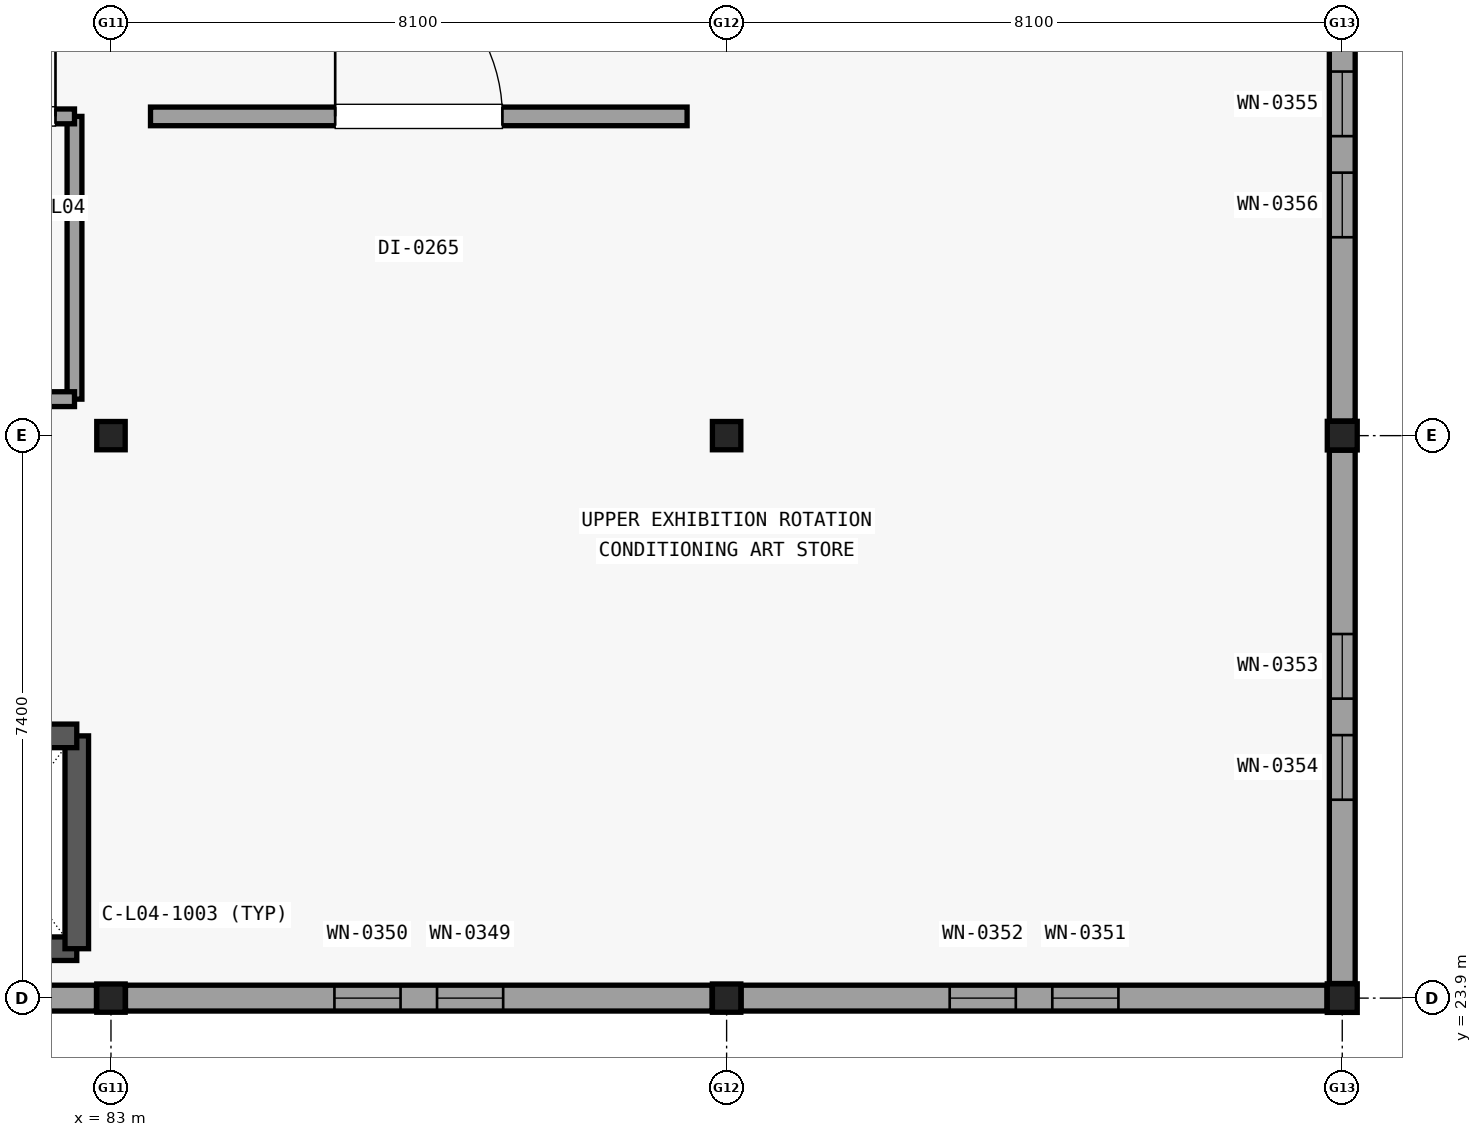
"""IFC4 building model, lengths in metres.
Left out: names, types, materials, properties, quantities, classifications, styles, units other than length and angle.
Written with IfcOpenShell. Run it as: python <this file> out.ifc"""

import sys

from ifc_helpers import new_model, si_unit, direction, frame, frame_2d, origin, origin_2d, place, context, subcontext, project, spatial, rectangle, i_section, extrude, element, fill, save


model = new_model("IFC4")
c1 = context("Model", 3, precision=1e-05, world=origin(), true_north=direction((0.0, 1.0)))
c2 = subcontext(c1, "Body", "Model", "MODEL_VIEW")
j1 = project(units=[si_unit("LENGTHUNIT", "METRE"), si_unit("PLANEANGLEUNIT", "RADIAN")], contexts=[c1])
p1 = place(None, origin())
s1 = spatial("IfcSite", under=j1, at=p1, CompositionType="ELEMENT")
p2 = place(p1, origin())
s2 = spatial("IfcBuilding", under=s1, at=p2, CompositionType="ELEMENT")
p3 = place(p2, frame((0.0, 0.0, 17.4)))
s3 = spatial("IfcBuildingStorey", under=s2, at=p3, CompositionType="ELEMENT", Elevation=17.4)
for number, where, z_axis, x_axis in (
    (1, (83.0, 23.9, 0.0), (0.0, 0.0, 1.0), (1.0, 0.0, 0.0)),
    (2, (83.0, 31.3, 0.0), (0.0, 0.0, 1.0), (1.0, 0.0, 0.0)),
    (3, (91.1, 23.9, 0.0), (0.0, 0.0, 1.0), (1.0, 0.0, 0.0)),
    (4, (91.1, 31.3, 0.0), (0.0, 0.0, 1.0), (1.0, 0.0, 0.0)),
):
    element("IfcColumn", number, at=place(p3, frame(where, z_axis=z_axis, x_axis=x_axis)), inside=s3, PredefinedType="COLUMN", context=c2, shape_type="SweptSolid", body=[
        extrude(i_section(OverallWidth=0.374, OverallDepth=0.372, WebThickness=0.016, FlangeThickness=0.026, at=origin_2d()), origin(), (0.0, 0.0, 1.0), 3.38),
    ])
for number, where, z_axis, x_axis in (
    (5, (99.2, 23.9, 0.0), (0.0, 0.0, 1.0), (1.0, 0.0, 0.0)),
    (6, (99.2, 31.3, 0.0), (0.0, 0.0, 1.0), (1.0, 0.0, 0.0)),
):
    element("IfcColumn", number, at=place(p3, frame(where, z_axis=z_axis, x_axis=x_axis)), inside=s3, PredefinedType="COLUMN", context=c2, shape_type="SweptSolid", body=[
        extrude(i_section(OverallWidth=0.394, OverallDepth=0.376, WebThickness=0.017, FlangeThickness=0.028, at=origin_2d()), origin(), (0.0, 0.0, 1.0), 3.38),
    ])
p4 = place(p3, frame((82.809, 23.9, 0.0), z_axis=(0.0, 0.0, 1.0), x_axis=(-1.0, 0.0, 0.0)))
e7 = element("IfcWall", 7, at=p4, inside=s3, PredefinedType="SOLIDWALL", context=c2, shape_type="SweptSolid", body=[
    extrude(rectangle(XDim=7.708, YDim=0.34, at=frame_2d((3.854, 0.0))), origin(), (0.0, 0.0, 1.0), 2.908),
])
p5 = place(p4, frame((2.744, 0.0, 0.6)))
e8 = element("IfcOpeningElement", 8, at=p5, cuts=e7, PredefinedType="OPENING", context=c2, shape_type="SweptSolid", body=[
    extrude(rectangle(XDim=0.87, YDim=1.82, at=frame_2d((0.435, 0.91))), frame((0.0, 0.18, 0.0), z_axis=(0.0, -1.0, 0.0), x_axis=(1.0, 0.0, 0.0)), (0.0, 0.0, 1.0), 0.36),
])
p6 = place(p4, frame((4.094, 0.0, 0.6)))
e9 = element("IfcOpeningElement", 9, at=p6, cuts=e7, PredefinedType="OPENING", context=c2, shape_type="SweptSolid", body=[
    extrude(rectangle(XDim=0.87, YDim=1.82, at=frame_2d((0.435, 0.91))), frame((0.0, 0.18, 0.0), z_axis=(0.0, -1.0, 0.0), x_axis=(1.0, 0.0, 0.0)), (0.0, 0.0, 1.0), 0.36),
])
p7 = place(p3, frame((90.909, 23.9, 0.0), z_axis=(0.0, 0.0, 1.0), x_axis=(-1.0, 0.0, 0.0)))
e10 = element("IfcWall", 10, at=p7, inside=s3, PredefinedType="SOLIDWALL", context=c2, shape_type="SweptSolid", body=[
    extrude(rectangle(XDim=7.718, YDim=0.34, at=frame_2d((3.859, 0.0))), origin(), (0.0, 0.0, 1.0), 2.908),
])
p8 = place(p7, frame((2.749, 0.0, 0.6)))
e11 = element("IfcOpeningElement", 11, at=p8, cuts=e10, PredefinedType="OPENING", context=c2, shape_type="SweptSolid", body=[
    extrude(rectangle(XDim=0.87, YDim=1.82, at=frame_2d((0.435, 0.91))), frame((0.0, 0.18, 0.0), z_axis=(0.0, -1.0, 0.0), x_axis=(1.0, 0.0, 0.0)), (0.0, 0.0, 1.0), 0.36),
])
p9 = place(p7, frame((4.099, 0.0, 0.6)))
e12 = element("IfcOpeningElement", 12, at=p9, cuts=e10, PredefinedType="OPENING", context=c2, shape_type="SweptSolid", body=[
    extrude(rectangle(XDim=0.87, YDim=1.82, at=frame_2d((0.435, 0.91))), frame((0.0, 0.18, 0.0), z_axis=(0.0, -1.0, 0.0), x_axis=(1.0, 0.0, 0.0)), (0.0, 0.0, 1.0), 0.36),
])
p10 = place(p3, frame((98.999, 23.9, 0.0), z_axis=(0.0, 0.0, 1.0), x_axis=(-1.0, 0.0, 0.0)))
e13 = element("IfcWall", 13, at=p10, inside=s3, PredefinedType="SOLIDWALL", context=c2, shape_type="SweptSolid", body=[
    extrude(rectangle(XDim=7.708, YDim=0.34, at=frame_2d((3.854, 0.0))), origin(), (0.0, 0.0, 1.0), 2.908),
])
p11 = place(p10, frame((2.744, 0.0, 0.6)))
e14 = element("IfcOpeningElement", 14, at=p11, cuts=e13, PredefinedType="OPENING", context=c2, shape_type="SweptSolid", body=[
    extrude(rectangle(XDim=0.87, YDim=1.82, at=frame_2d((0.435, 0.91))), frame((0.0, 0.18, 0.0), z_axis=(0.0, -1.0, 0.0), x_axis=(1.0, 0.0, 0.0)), (0.0, 0.0, 1.0), 0.36),
])
p12 = place(p10, frame((4.094, 0.0, 0.6)))
e15 = element("IfcOpeningElement", 15, at=p12, cuts=e13, PredefinedType="OPENING", context=c2, shape_type="SweptSolid", body=[
    extrude(rectangle(XDim=0.87, YDim=1.82, at=frame_2d((0.435, 0.91))), frame((0.0, 0.18, 0.0), z_axis=(0.0, -1.0, 0.0), x_axis=(1.0, 0.0, 0.0)), (0.0, 0.0, 1.0), 0.36),
])
p13 = place(p3, frame((99.2, 31.108, 0.0), z_axis=(0.0, 0.0, 1.0), x_axis=(0.0, -1.0, 0.0)))
e16 = element("IfcWall", 16, at=p13, inside=s3, PredefinedType="SOLIDWALL", context=c2, shape_type="SweptSolid", body=[
    extrude(rectangle(XDim=7.016, YDim=0.34, at=frame_2d((3.508, 0.0))), origin(), (0.0, 0.0, 1.0), 2.908),
])
p14 = place(p13, frame((2.418, 0.0, 0.6)))
e17 = element("IfcOpeningElement", 17, at=p14, cuts=e16, PredefinedType="OPENING", context=c2, shape_type="SweptSolid", body=[
    extrude(rectangle(XDim=0.85, YDim=1.88, at=frame_2d((0.425, 0.94))), frame((0.0, 0.18, 0.0), z_axis=(0.0, -1.0, 0.0), x_axis=(1.0, 0.0, 0.0)), (0.0, 0.0, 1.0), 0.36),
])
p15 = place(p13, frame((3.748, 0.0, 0.6)))
e18 = element("IfcOpeningElement", 18, at=p15, cuts=e16, PredefinedType="OPENING", context=c2, shape_type="SweptSolid", body=[
    extrude(rectangle(XDim=0.85, YDim=1.88, at=frame_2d((0.425, 0.94))), frame((0.0, 0.18, 0.0), z_axis=(0.0, -1.0, 0.0), x_axis=(1.0, 0.0, 0.0)), (0.0, 0.0, 1.0), 0.36),
])
p16 = place(p3, frame((99.2, 38.508, 0.0), z_axis=(0.0, 0.0, 1.0), x_axis=(0.0, -1.0, 0.0)))
e19 = element("IfcWall", 19, at=p16, inside=s3, PredefinedType="SOLIDWALL", context=c2, shape_type="SweptSolid", body=[
    extrude(rectangle(XDim=7.016, YDim=0.34, at=frame_2d((3.508, 0.0))), origin(), (0.0, 0.0, 1.0), 2.681),
])
p17 = place(p16, frame((2.418, 0.0, 0.6)))
e20 = element("IfcOpeningElement", 20, at=p17, cuts=e19, PredefinedType="OPENING", context=c2, shape_type="SweptSolid", body=[
    extrude(rectangle(XDim=0.85, YDim=1.88, at=frame_2d((0.425, 0.94))), frame((0.0, 0.18, 0.0), z_axis=(0.0, -1.0, 0.0), x_axis=(1.0, 0.0, 0.0)), (0.0, 0.0, 1.0), 0.36),
])
p18 = place(p16, frame((3.748, 0.0, 0.6)))
e21 = element("IfcOpeningElement", 21, at=p18, cuts=e19, PredefinedType="OPENING", context=c2, shape_type="SweptSolid", body=[
    extrude(rectangle(XDim=0.85, YDim=1.88, at=frame_2d((0.425, 0.94))), frame((0.0, 0.18, 0.0), z_axis=(0.0, -1.0, 0.0), x_axis=(1.0, 0.0, 0.0)), (0.0, 0.0, 1.0), 0.36),
])
p19 = place(p3, frame((80.35, 24.55, 0.0), z_axis=(0.0, 0.0, 1.0), x_axis=(1.0, 0.0, 0.0)))
e22 = element("IfcWall", 22, at=p19, inside=s3, PredefinedType="SHEAR", context=c2, shape_type="SweptSolid", body=[
    extrude(rectangle(XDim=2.2, YDim=0.31, at=frame_2d((1.1, 0.0))), origin(), (0.0, 0.0, 1.0), 3.375),
])
p20 = place(p3, frame((82.55, 24.55, 0.0), z_axis=(0.0, 0.0, 1.0), x_axis=(0.0, 1.0, 0.0)))
e23 = element("IfcWall", 23, at=p20, inside=s3, PredefinedType="SHEAR", context=c2, shape_type="SweptSolid", body=[
    extrude(rectangle(XDim=2.8, YDim=0.31, at=frame_2d((1.4, 0.0))), origin(), (0.0, 0.0, 1.0), 3.375),
])
p21 = place(p3, frame((80.35, 27.35, 0.0), z_axis=(0.0, 0.0, 1.0), x_axis=(1.0, 0.0, 0.0)))
e24 = element("IfcWall", 24, at=p21, inside=s3, PredefinedType="SHEAR", context=c2, shape_type="SweptSolid", body=[
    extrude(rectangle(XDim=2.2, YDim=0.31, at=frame_2d((1.1, 0.0))), origin(), (0.0, 0.0, 1.0), 3.375),
])
p22 = place(p21, frame((0.5, 0.0, 0.0)))
e25 = element("IfcOpeningElement", 25, at=p22, cuts=e24, PredefinedType="OPENING", context=c2, shape_type="SweptSolid", body=[
    extrude(rectangle(XDim=1.2, YDim=2.15, at=frame_2d((0.6, 1.075))), frame((0.0, 0.165, 0.0), z_axis=(0.0, -1.0, 0.0), x_axis=(1.0, 0.0, 0.0)), (0.0, 0.0, 1.0), 0.33),
])
p23 = place(p3, frame((82.52, 31.78, 0.0), z_axis=(0.0, 0.0, 1.0), x_axis=(0.0, 1.0, 0.0)))
e26 = element("IfcWall", 26, at=p23, inside=s3, PredefinedType="PARTITIONING", context=c2, shape_type="SweptSolid", body=[
    extrude(rectangle(XDim=3.72, YDim=0.195, at=frame_2d((1.86, 0.0))), origin(), (0.0, 0.0, 1.0), 2.913),
])
p24 = place(p3, frame((79.55, 31.78, 0.0), z_axis=(0.0, 0.0, 1.0), x_axis=(1.0, 0.0, 0.0)))
e27 = element("IfcWall", 27, at=p24, inside=s3, PredefinedType="PARTITIONING", context=c2, shape_type="SweptSolid", body=[
    extrude(rectangle(XDim=2.97, YDim=0.195, at=frame_2d((1.485, 0.0))), origin(), (0.0, 0.0, 1.0), 2.913),
])
p25 = place(p3, frame((79.55, 35.5, 0.0), z_axis=(0.0, 0.0, 1.0), x_axis=(1.0, 0.0, 0.0)))
e28 = element("IfcWall", 28, at=p25, inside=s3, PredefinedType="PARTITIONING", context=c2, shape_type="SweptSolid", body=[
    extrude(rectangle(XDim=2.97, YDim=0.195, at=frame_2d((1.485, 0.0))), origin(), (0.0, 0.0, 1.0), 3.365),
])
p26 = place(p25, frame((0.25, 0.0, 0.0)))
e29 = element("IfcOpeningElement", 29, at=p26, cuts=e28, PredefinedType="OPENING", context=c2, shape_type="SweptSolid", body=[
    extrude(rectangle(XDim=0.95, YDim=2.1, at=frame_2d((0.475, 1.05))), frame((0.0, 0.107, 0.0), z_axis=(0.0, -1.0, 0.0), x_axis=(1.0, 0.0, 0.0)), (0.0, 0.0, 1.0), 0.215),
])
p27 = place(p25, frame((1.82, 0.0, 0.0)))
e30 = element("IfcOpeningElement", 30, at=p27, cuts=e28, PredefinedType="OPENING", context=c2, shape_type="SweptSolid", body=[
    extrude(rectangle(XDim=0.9, YDim=2.1, at=frame_2d((0.45, 1.05))), frame((0.0, 0.107, 0.0), z_axis=(0.0, -1.0, 0.0), x_axis=(1.0, 0.0, 0.0)), (0.0, 0.0, 1.0), 0.215),
])
p28 = place(p3, frame((83.52, 35.5, 0.0), z_axis=(0.0, 0.0, 1.0), x_axis=(1.0, 0.0, 0.0)))
e31 = element("IfcWall", 31, at=p28, inside=s3, PredefinedType="PARTITIONING", context=c2, shape_type="SweptSolid", body=[
    extrude(rectangle(XDim=7.06, YDim=0.245, at=frame_2d((3.53, 0.0))), origin(), (0.0, 0.0, 1.0), 3.365),
])
p29 = place(p28, frame((2.43, 0.0, 0.0)))
e32 = element("IfcOpeningElement", 32, at=p29, cuts=e31, PredefinedType="OPENING", context=c2, shape_type="SweptSolid", body=[
    extrude(rectangle(XDim=2.2, YDim=2.65, at=frame_2d((1.1, 1.325))), frame((0.0, 0.133, 0.0), z_axis=(0.0, -1.0, 0.0), x_axis=(1.0, 0.0, 0.0)), (0.0, 0.0, 1.0), 0.265),
])
p30 = place(p8, origin())
e33 = element("IfcWindow", 33, at=p30, inside=s3, PartitioningType="SINGLE_PANEL", PredefinedType="WINDOW", context=c2, shape_type="SweptSolid", body=[
    extrude(rectangle(XDim=0.87, YDim=1.82, at=frame_2d((0.435, 0.91))), frame((0.0, 0.03, 0.0), z_axis=(0.0, -1.0, 0.0), x_axis=(1.0, 0.0, 0.0)), (0.0, 0.0, 1.0), 0.06),
])
fill(e11, e33)
p31 = place(p9, origin())
e34 = element("IfcWindow", 34, at=p31, inside=s3, PartitioningType="SINGLE_PANEL", PredefinedType="WINDOW", context=c2, shape_type="SweptSolid", body=[
    extrude(rectangle(XDim=0.87, YDim=1.82, at=frame_2d((0.435, 0.91))), frame((0.0, 0.03, 0.0), z_axis=(0.0, -1.0, 0.0), x_axis=(1.0, 0.0, 0.0)), (0.0, 0.0, 1.0), 0.06),
])
fill(e12, e34)
p32 = place(p11, origin())
e35 = element("IfcWindow", 35, at=p32, inside=s3, PartitioningType="SINGLE_PANEL", PredefinedType="WINDOW", context=c2, shape_type="SweptSolid", body=[
    extrude(rectangle(XDim=0.87, YDim=1.82, at=frame_2d((0.435, 0.91))), frame((0.0, 0.03, 0.0), z_axis=(0.0, -1.0, 0.0), x_axis=(1.0, 0.0, 0.0)), (0.0, 0.0, 1.0), 0.06),
])
fill(e14, e35)
p33 = place(p12, origin())
e36 = element("IfcWindow", 36, at=p33, inside=s3, PartitioningType="SINGLE_PANEL", PredefinedType="WINDOW", context=c2, shape_type="SweptSolid", body=[
    extrude(rectangle(XDim=0.87, YDim=1.82, at=frame_2d((0.435, 0.91))), frame((0.0, 0.03, 0.0), z_axis=(0.0, -1.0, 0.0), x_axis=(1.0, 0.0, 0.0)), (0.0, 0.0, 1.0), 0.06),
])
fill(e15, e36)
p34 = place(p14, origin())
e37 = element("IfcWindow", 37, at=p34, inside=s3, PartitioningType="SINGLE_PANEL", PredefinedType="WINDOW", context=c2, shape_type="SweptSolid", body=[
    extrude(rectangle(XDim=0.85, YDim=1.88, at=frame_2d((0.425, 0.94))), frame((0.0, 0.03, 0.0), z_axis=(0.0, -1.0, 0.0), x_axis=(1.0, 0.0, 0.0)), (0.0, 0.0, 1.0), 0.06),
])
fill(e17, e37)
p35 = place(p15, origin())
e38 = element("IfcWindow", 38, at=p35, inside=s3, PartitioningType="SINGLE_PANEL", PredefinedType="WINDOW", context=c2, shape_type="SweptSolid", body=[
    extrude(rectangle(XDim=0.85, YDim=1.88, at=frame_2d((0.425, 0.94))), frame((0.0, 0.03, 0.0), z_axis=(0.0, -1.0, 0.0), x_axis=(1.0, 0.0, 0.0)), (0.0, 0.0, 1.0), 0.06),
])
fill(e18, e38)
p36 = place(p17, origin())
e39 = element("IfcWindow", 39, at=p36, inside=s3, PartitioningType="SINGLE_PANEL", PredefinedType="WINDOW", context=c2, shape_type="SweptSolid", body=[
    extrude(rectangle(XDim=0.85, YDim=1.88, at=frame_2d((0.425, 0.94))), frame((0.0, 0.03, 0.0), z_axis=(0.0, -1.0, 0.0), x_axis=(1.0, 0.0, 0.0)), (0.0, 0.0, 1.0), 0.06),
])
fill(e20, e39)
p37 = place(p18, origin())
e40 = element("IfcWindow", 40, at=p37, inside=s3, PartitioningType="SINGLE_PANEL", PredefinedType="WINDOW", context=c2, shape_type="SweptSolid", body=[
    extrude(rectangle(XDim=0.85, YDim=1.88, at=frame_2d((0.425, 0.94))), frame((0.0, 0.03, 0.0), z_axis=(0.0, -1.0, 0.0), x_axis=(1.0, 0.0, 0.0)), (0.0, 0.0, 1.0), 0.06),
])
fill(e21, e40)
p38 = place(p27, origin())
e41 = element("IfcDoor", 41, at=p38, inside=s3, OperationType="SINGLE_SWING_RIGHT", PredefinedType="DOOR", context=c2, shape_type="SweptSolid", body=[
    extrude(rectangle(XDim=0.9, YDim=2.1, at=frame_2d((0.45, 1.05))), frame((0.0, 0.025, 0.0), z_axis=(0.0, -1.0, 0.0), x_axis=(1.0, 0.0, 0.0)), (0.0, 0.0, 1.0), 0.05),
])
fill(e30, e41)
p39 = place(p29, origin())
e42 = element("IfcDoor", 42, at=p39, inside=s3, OperationType="SINGLE_SWING_LEFT", PredefinedType="DOOR", context=c2, shape_type="SweptSolid", body=[
    extrude(rectangle(XDim=2.2, YDim=2.65, at=frame_2d((1.1, 1.325))), frame((0.0, 0.025, 0.0), z_axis=(0.0, -1.0, 0.0), x_axis=(1.0, 0.0, 0.0)), (0.0, 0.0, 1.0), 0.05),
])
fill(e32, e42)
save(model, sys.argv[1])
